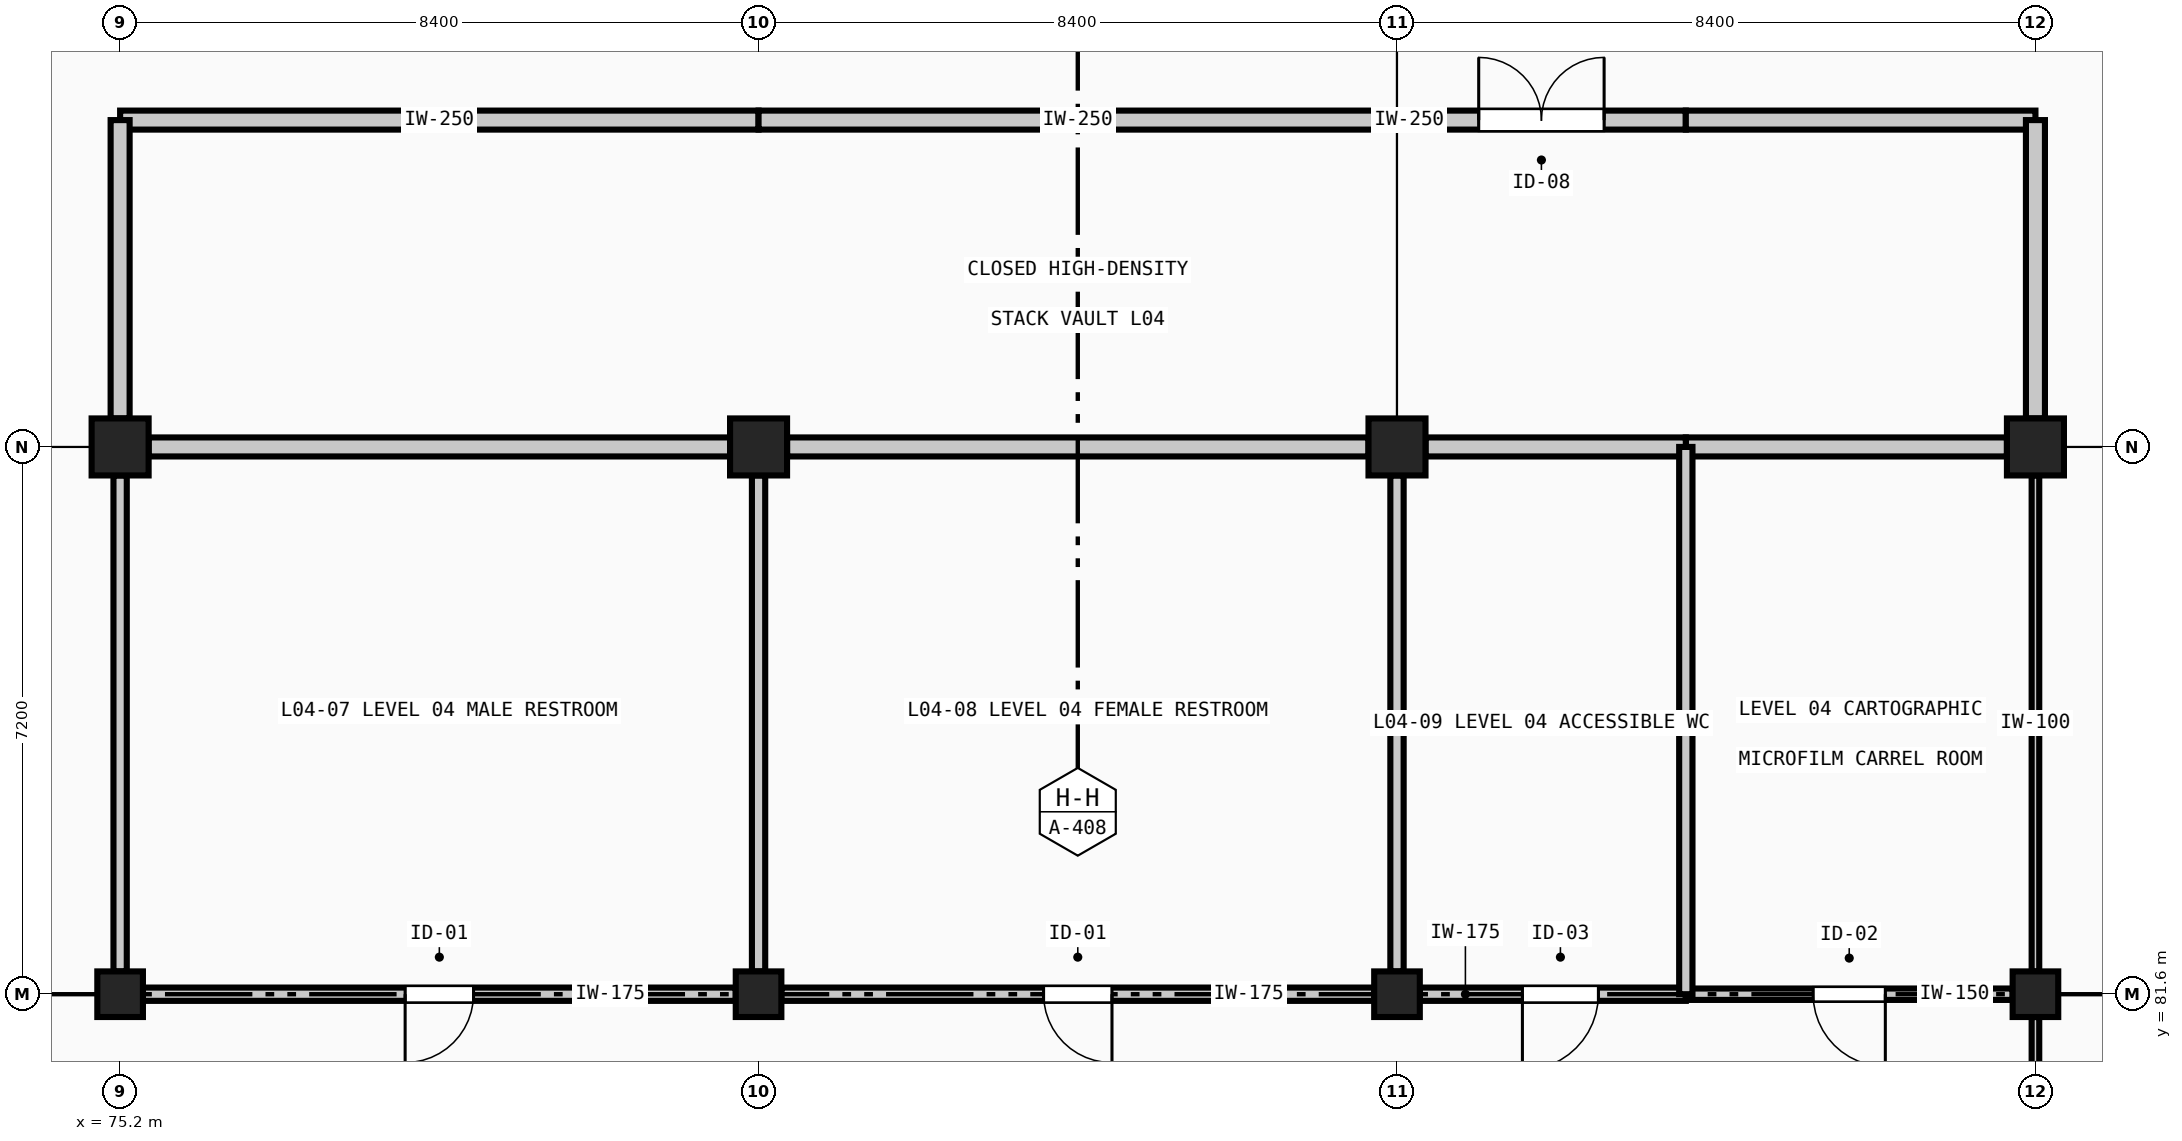
"""IFC4 building model, lengths in metres.
Left out: names, types, materials, properties, quantities, classifications, styles, units other than length and angle.
Written with IfcOpenShell. Run it as: python <this file> out.ifc"""

import sys

from ifc_helpers import new_model, si_unit, direction, frame, frame_2d, origin, origin_2d, place, context, subcontext, project, spatial, rectangle, extrude, element, fill, save


model = new_model("IFC4")
c1 = context("Model", 3, precision=1e-05, world=origin(), true_north=direction((0.0, 1.0)))
c2 = subcontext(c1, "Body", "Model", "MODEL_VIEW")
j1 = project(units=[si_unit("LENGTHUNIT", "METRE"), si_unit("PLANEANGLEUNIT", "RADIAN")], contexts=[c1])
p1 = place(None, origin())
s1 = spatial("IfcSite", under=j1, at=p1, CompositionType="ELEMENT")
p2 = place(p1, origin())
s2 = spatial("IfcBuilding", under=s1, at=p2, CompositionType="ELEMENT")
p3 = place(p2, frame((0.0, 0.0, 18.88)))
s3 = spatial("IfcBuildingStorey", under=s2, at=p3, CompositionType="ELEMENT", Elevation=18.88)
p4 = place(p3, frame((75.2, 81.6, 0.0), z_axis=(0.0, 0.0, 1.0), x_axis=(1.0, 0.0, 0.0)))
e1 = element("IfcColumn", 1, at=p4, inside=s3, PredefinedType="COLUMN", context=c2, shape_type="SweptSolid", body=[
    extrude(rectangle(XDim=0.6, YDim=0.6, at=origin_2d()), origin(), (0.0, 0.0, 1.0), 4.48),
])
p5 = place(p3, frame((75.2, 88.8, 0.0), z_axis=(0.0, 0.0, 1.0), x_axis=(1.0, 0.0, 0.0)))
e2 = element("IfcColumn", 2, at=p5, inside=s3, PredefinedType="COLUMN", context=c2, shape_type="SweptSolid", body=[
    extrude(rectangle(XDim=0.75, YDim=0.75, at=origin_2d()), origin(), (0.0, 0.0, 1.0), 4.48),
])
p6 = place(p3, frame((83.6, 81.6, 0.0), z_axis=(0.0, 0.0, 1.0), x_axis=(1.0, 0.0, 0.0)))
e3 = element("IfcColumn", 3, at=p6, inside=s3, PredefinedType="COLUMN", context=c2, shape_type="SweptSolid", body=[
    extrude(rectangle(XDim=0.6, YDim=0.6, at=origin_2d()), origin(), (0.0, 0.0, 1.0), 4.48),
])
p7 = place(p3, frame((83.6, 88.8, 0.0), z_axis=(0.0, 0.0, 1.0), x_axis=(1.0, 0.0, 0.0)))
e4 = element("IfcColumn", 4, at=p7, inside=s3, PredefinedType="COLUMN", context=c2, shape_type="SweptSolid", body=[
    extrude(rectangle(XDim=0.75, YDim=0.75, at=origin_2d()), origin(), (0.0, 0.0, 1.0), 4.48),
])
p8 = place(p3, frame((92.0, 81.6, 0.0), z_axis=(0.0, 0.0, 1.0), x_axis=(1.0, 0.0, 0.0)))
e5 = element("IfcColumn", 5, at=p8, inside=s3, PredefinedType="COLUMN", context=c2, shape_type="SweptSolid", body=[
    extrude(rectangle(XDim=0.6, YDim=0.6, at=origin_2d()), origin(), (0.0, 0.0, 1.0), 4.48),
])
p9 = place(p3, frame((92.0, 88.8, 0.0), z_axis=(0.0, 0.0, 1.0), x_axis=(1.0, 0.0, 0.0)))
e6 = element("IfcColumn", 6, at=p9, inside=s3, PredefinedType="COLUMN", context=c2, shape_type="SweptSolid", body=[
    extrude(rectangle(XDim=0.75, YDim=0.75, at=origin_2d()), origin(), (0.0, 0.0, 1.0), 4.48),
])
p10 = place(p3, frame((100.4, 81.6, 0.0), z_axis=(0.0, 0.0, 1.0), x_axis=(1.0, 0.0, 0.0)))
e7 = element("IfcColumn", 7, at=p10, inside=s3, PredefinedType="COLUMN", context=c2, shape_type="SweptSolid", body=[
    extrude(rectangle(XDim=0.6, YDim=0.6, at=origin_2d()), origin(), (0.0, 0.0, 1.0), 4.48),
])
p11 = place(p3, frame((100.4, 88.8, 0.0), z_axis=(0.0, 0.0, 1.0), x_axis=(1.0, 0.0, 0.0)))
e8 = element("IfcColumn", 8, at=p11, inside=s3, PredefinedType="COLUMN", context=c2, shape_type="SweptSolid", body=[
    extrude(rectangle(XDim=0.75, YDim=0.75, at=origin_2d()), origin(), (0.0, 0.0, 1.0), 4.48),
])
p12 = place(p3, frame((75.2, 93.1, 0.0), z_axis=(0.0, 0.0, 1.0), x_axis=(1.0, 0.0, 0.0)))
e9 = element("IfcWall", 9, at=p12, inside=s3, PredefinedType="SOLIDWALL", context=c2, shape_type="SweptSolid", body=[
    extrude(rectangle(XDim=8.4, YDim=0.25, at=frame_2d((4.2, 0.0))), origin(), (0.0, 0.0, 1.0), 4.255),
])
p13 = place(p3, frame((83.6, 93.1, 0.0), z_axis=(0.0, 0.0, 1.0), x_axis=(1.0, 0.0, 0.0)))
e10 = element("IfcWall", 10, at=p13, inside=s3, PredefinedType="SOLIDWALL", context=c2, shape_type="SweptSolid", body=[
    extrude(rectangle(XDim=8.4, YDim=0.25, at=frame_2d((4.2, 0.0))), origin(), (0.0, 0.0, 1.0), 4.255),
])
p14 = place(p3, frame((92.0, 93.1, 0.0), z_axis=(0.0, 0.0, 1.0), x_axis=(1.0, 0.0, 0.0)))
e11 = element("IfcWall", 11, at=p14, inside=s3, PredefinedType="SOLIDWALL", context=c2, shape_type="SweptSolid", body=[
    extrude(rectangle(XDim=3.8, YDim=0.25, at=frame_2d((1.9, 0.0))), origin(), (0.0, 0.0, 1.0), 4.255),
])
p15 = place(p14, frame((1.075, 0.0, 0.0)))
e12 = element("IfcOpeningElement", 12, at=p15, cuts=e11, PredefinedType="OPENING", context=c2, shape_type="SweptSolid", body=[
    extrude(rectangle(XDim=1.65, YDim=2.25, at=frame_2d((0.825, 1.125))), frame((0.0, 0.135, 0.0), z_axis=(0.0, -1.0, 0.0), x_axis=(1.0, 0.0, 0.0)), (0.0, 0.0, 1.0), 0.27),
])
p16 = place(p3, frame((95.8, 93.1, 0.0), z_axis=(0.0, 0.0, 1.0), x_axis=(1.0, 0.0, 0.0)))
e13 = element("IfcWall", 13, at=p16, inside=s3, PredefinedType="SOLIDWALL", context=c2, shape_type="SweptSolid", body=[
    extrude(rectangle(XDim=4.6, YDim=0.25, at=frame_2d((2.3, 0.0))), origin(), (0.0, 0.0, 1.0), 4.255),
])
p17 = place(p3, frame((83.3, 81.6, 0.0), z_axis=(0.0, 0.0, 1.0), x_axis=(-1.0, 0.0, 0.0)))
e14 = element("IfcWall", 14, at=p17, inside=s3, PredefinedType="PLUMBINGWALL", context=c2, shape_type="SweptSolid", body=[
    extrude(rectangle(XDim=7.8, YDim=0.175, at=frame_2d((3.9, 0.0))), origin(), (0.0, 0.0, 1.0), 3.68),
])
p18 = place(p17, frame((3.45, 0.0, 0.0)))
e15 = element("IfcOpeningElement", 15, at=p18, cuts=e14, PredefinedType="OPENING", context=c2, shape_type="SweptSolid", body=[
    extrude(rectangle(XDim=0.9, YDim=2.1, at=frame_2d((0.45, 1.05))), frame((0.0, 0.097, 0.0), z_axis=(0.0, -1.0, 0.0), x_axis=(1.0, 0.0, 0.0)), (0.0, 0.0, 1.0), 0.195),
])
p19 = place(p3, frame((91.7, 81.6, 0.0), z_axis=(0.0, 0.0, 1.0), x_axis=(-1.0, 0.0, 0.0)))
e16 = element("IfcWall", 16, at=p19, inside=s3, PredefinedType="PLUMBINGWALL", context=c2, shape_type="SweptSolid", body=[
    extrude(rectangle(XDim=7.8, YDim=0.175, at=frame_2d((3.9, 0.0))), origin(), (0.0, 0.0, 1.0), 3.68),
])
p20 = place(p19, frame((3.45, 0.0, 0.0)))
e17 = element("IfcOpeningElement", 17, at=p20, cuts=e16, PredefinedType="OPENING", context=c2, shape_type="SweptSolid", body=[
    extrude(rectangle(XDim=0.9, YDim=2.1, at=frame_2d((0.45, 1.05))), frame((0.0, 0.097, 0.0), z_axis=(0.0, -1.0, 0.0), x_axis=(1.0, 0.0, 0.0)), (0.0, 0.0, 1.0), 0.195),
])
p21 = place(p3, frame((95.8, 81.6, 0.0), z_axis=(0.0, 0.0, 1.0), x_axis=(-1.0, 0.0, 0.0)))
e18 = element("IfcWall", 18, at=p21, inside=s3, PredefinedType="PLUMBINGWALL", context=c2, shape_type="SweptSolid", body=[
    extrude(rectangle(XDim=3.5, YDim=0.175, at=frame_2d((1.75, 0.0))), origin(), (0.0, 0.0, 1.0), 3.68),
])
p22 = place(p21, frame((1.15, 0.0, 0.0)))
e19 = element("IfcOpeningElement", 19, at=p22, cuts=e18, PredefinedType="OPENING", context=c2, shape_type="SweptSolid", body=[
    extrude(rectangle(XDim=1.0, YDim=2.15, at=frame_2d((0.5, 1.075))), frame((0.0, 0.097, 0.0), z_axis=(0.0, -1.0, 0.0), x_axis=(1.0, 0.0, 0.0)), (0.0, 0.0, 1.0), 0.195),
])
p23 = place(p3, frame((100.1, 81.6, 0.0), z_axis=(0.0, 0.0, 1.0), x_axis=(-1.0, 0.0, 0.0)))
e20 = element("IfcWall", 20, at=p23, inside=s3, PredefinedType="PARTITIONING", context=c2, shape_type="SweptSolid", body=[
    extrude(rectangle(XDim=4.3, YDim=0.15, at=frame_2d((2.15, 0.0))), origin(), (0.0, 0.0, 1.0), 3.68),
])
p24 = place(p23, frame((1.675, 0.0, 0.0)))
e21 = element("IfcOpeningElement", 21, at=p24, cuts=e20, PredefinedType="OPENING", context=c2, shape_type="SweptSolid", body=[
    extrude(rectangle(XDim=0.95, YDim=2.15, at=frame_2d((0.475, 1.075))), frame((0.0, 0.085, 0.0), z_axis=(0.0, -1.0, 0.0), x_axis=(1.0, 0.0, 0.0)), (0.0, 0.0, 1.0), 0.17),
])
for number, where, z_axis, x_axis in (
    (22, (100.4, 74.775, 0.0), (0.0, 0.0, 1.0), (0.0, 1.0, 0.0)),
    (23, (100.4, 81.9, 0.0), (0.0, 0.0, 1.0), (0.0, 1.0, 0.0)),
):
    element("IfcWall", number, at=place(p3, frame(where, z_axis=z_axis, x_axis=x_axis)), inside=s3, PredefinedType="MOVABLE", context=c2, shape_type="SweptSolid", body=[
        extrude(rectangle(XDim=6.525, YDim=0.1, at=frame_2d((3.263, 0.0))), origin(), (0.0, 0.0, 1.0), 3.73),
    ])
p25 = place(p3, frame((100.025, 88.8, 0.0), z_axis=(0.0, 0.0, 1.0), x_axis=(-1.0, 0.0, 0.0)))
e24 = element("IfcWall", 24, at=p25, inside=s3, PredefinedType="SOLIDWALL", context=c2, shape_type="SweptSolid", body=[
    extrude(rectangle(XDim=4.225, YDim=0.25, at=frame_2d((2.112, 0.0))), origin(), (0.0, 0.0, 1.0), 3.53),
])
p26 = place(p3, frame((95.8, 88.8, 0.0), z_axis=(0.0, 0.0, 1.0), x_axis=(-1.0, 0.0, 0.0)))
e25 = element("IfcWall", 25, at=p26, inside=s3, PredefinedType="SOLIDWALL", context=c2, shape_type="SweptSolid", body=[
    extrude(rectangle(XDim=3.425, YDim=0.25, at=frame_2d((1.712, 0.0))), origin(), (0.0, 0.0, 1.0), 3.53),
])
p27 = place(p3, frame((91.625, 88.8, 0.0), z_axis=(0.0, 0.0, 1.0), x_axis=(-1.0, 0.0, 0.0)))
e26 = element("IfcWall", 26, at=p27, inside=s3, PredefinedType="SOLIDWALL", context=c2, shape_type="SweptSolid", body=[
    extrude(rectangle(XDim=7.65, YDim=0.25, at=frame_2d((3.825, 0.0))), origin(), (0.0, 0.0, 1.0), 3.53),
])
p28 = place(p3, frame((83.225, 88.8, 0.0), z_axis=(0.0, 0.0, 1.0), x_axis=(-1.0, 0.0, 0.0)))
e27 = element("IfcWall", 27, at=p28, inside=s3, PredefinedType="SOLIDWALL", context=c2, shape_type="SweptSolid", body=[
    extrude(rectangle(XDim=7.65, YDim=0.25, at=frame_2d((3.825, 0.0))), origin(), (0.0, 0.0, 1.0), 3.53),
])
for number, where, z_axis, x_axis in (
    (28, (75.2, 89.175, 0.0), (0.0, 0.0, 1.0), (0.0, 1.0, 0.0)),
    (29, (100.4, 93.1, 0.0), (0.0, 0.0, 1.0), (0.0, -1.0, 0.0)),
):
    element("IfcWall", number, at=place(p3, frame(where, z_axis=z_axis, x_axis=x_axis)), inside=s3, PredefinedType="SOLIDWALL", context=c2, shape_type="SweptSolid", body=[
        extrude(rectangle(XDim=3.925, YDim=0.25, at=frame_2d((1.962, 0.0))), origin(), (0.0, 0.0, 1.0), 3.53),
    ])
for number, where, z_axis, x_axis in (
    (30, (75.2, 81.9, 0.0), (0.0, 0.0, 1.0), (0.0, 1.0, 0.0)),
    (31, (83.6, 88.425, 0.0), (0.0, 0.0, 1.0), (0.0, -1.0, 0.0)),
    (32, (92.0, 88.425, 0.0), (0.0, 0.0, 1.0), (0.0, -1.0, 0.0)),
):
    element("IfcWall", number, at=place(p3, frame(where, z_axis=z_axis, x_axis=x_axis)), inside=s3, PredefinedType="PLUMBINGWALL", context=c2, shape_type="SweptSolid", body=[
        extrude(rectangle(XDim=6.525, YDim=0.175, at=frame_2d((3.263, 0.0))), origin(), (0.0, 0.0, 1.0), 3.73),
    ])
p29 = place(p3, frame((95.8, 88.8, 0.0), z_axis=(0.0, 0.0, 1.0), x_axis=(0.0, -1.0, 0.0)))
e33 = element("IfcWall", 33, at=p29, inside=s3, PredefinedType="PLUMBINGWALL", context=c2, shape_type="SweptSolid", body=[
    extrude(rectangle(XDim=7.2, YDim=0.175, at=frame_2d((3.6, 0.0))), origin(), (0.0, 0.0, 1.0), 4.255),
])
p30 = place(p15, origin())
e34 = element("IfcDoor", 34, at=p30, inside=s3, OperationType="DOUBLE_DOOR_SINGLE_SWING", PredefinedType="DOOR", context=c2, shape_type="SweptSolid", body=[
    extrude(rectangle(XDim=1.65, YDim=2.25, at=frame_2d((0.825, 1.125))), frame((0.0, 0.025, 0.0), z_axis=(0.0, -1.0, 0.0), x_axis=(1.0, 0.0, 0.0)), (0.0, 0.0, 1.0), 0.05),
])
fill(e12, e34)
p31 = place(p18, origin())
e35 = element("IfcDoor", 35, at=p31, inside=s3, OperationType="SINGLE_SWING_RIGHT", PredefinedType="DOOR", context=c2, shape_type="SweptSolid", body=[
    extrude(rectangle(XDim=0.9, YDim=2.1, at=frame_2d((0.45, 1.05))), frame((0.0, 0.025, 0.0), z_axis=(0.0, -1.0, 0.0), x_axis=(1.0, 0.0, 0.0)), (0.0, 0.0, 1.0), 0.05),
])
fill(e15, e35)
p32 = place(p20, origin())
e36 = element("IfcDoor", 36, at=p32, inside=s3, OperationType="SINGLE_SWING_LEFT", PredefinedType="DOOR", context=c2, shape_type="SweptSolid", body=[
    extrude(rectangle(XDim=0.9, YDim=2.1, at=frame_2d((0.45, 1.05))), frame((0.0, 0.025, 0.0), z_axis=(0.0, -1.0, 0.0), x_axis=(1.0, 0.0, 0.0)), (0.0, 0.0, 1.0), 0.05),
])
fill(e17, e36)
p33 = place(p22, origin())
e37 = element("IfcDoor", 37, at=p33, inside=s3, OperationType="SINGLE_SWING_RIGHT", PredefinedType="DOOR", context=c2, shape_type="SweptSolid", body=[
    extrude(rectangle(XDim=1.0, YDim=2.15, at=frame_2d((0.5, 1.075))), frame((0.0, 0.025, 0.0), z_axis=(0.0, -1.0, 0.0), x_axis=(1.0, 0.0, 0.0)), (0.0, 0.0, 1.0), 0.05),
])
fill(e19, e37)
p34 = place(p24, origin())
e38 = element("IfcDoor", 38, at=p34, inside=s3, OperationType="SINGLE_SWING_LEFT", PredefinedType="DOOR", context=c2, shape_type="SweptSolid", body=[
    extrude(rectangle(XDim=0.95, YDim=2.15, at=frame_2d((0.475, 1.075))), frame((0.0, 0.025, 0.0), z_axis=(0.0, -1.0, 0.0), x_axis=(1.0, 0.0, 0.0)), (0.0, 0.0, 1.0), 0.05),
])
fill(e21, e38)
save(model, sys.argv[1])
